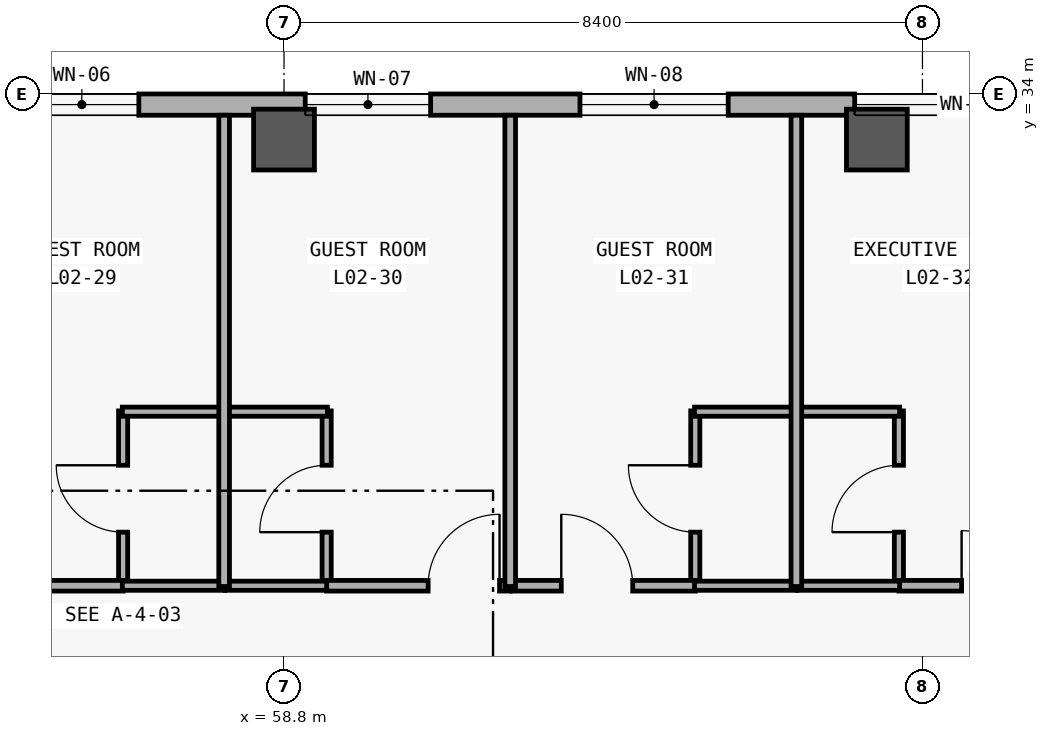
"""IFC4 building model, lengths in metres.
Left out: names, types, materials, properties, quantities, classifications, styles, units other than length and angle.
Written with IfcOpenShell. Run it as: python <this file> out.ifc"""

import sys

from ifc_helpers import new_model, si_unit, direction, frame, frame_2d, origin, origin_2d, place, context, subcontext, project, spatial, rectangle, extrude, element, fill, save


model = new_model("IFC4")
c1 = context("Model", 3, precision=1e-05, world=origin(), true_north=direction((0.0, 1.0)))
c2 = subcontext(c1, "Body", "Model", "MODEL_VIEW")
j1 = project(units=[si_unit("LENGTHUNIT", "METRE"), si_unit("PLANEANGLEUNIT", "RADIAN")], contexts=[c1])
p1 = place(None, origin())
s1 = spatial("IfcSite", under=j1, at=p1, CompositionType="ELEMENT")
p2 = place(p1, origin())
s2 = spatial("IfcBuilding", under=s1, at=p2, CompositionType="ELEMENT")
p3 = place(p2, frame((0.0, 0.0, 10.8)))
s3 = spatial("IfcBuildingStorey", under=s2, at=p3, CompositionType="ELEMENT", Elevation=10.8)
for number, where, z_axis, x_axis in (
    (1, (58.8, 33.4, 0.0), (0.0, 0.0, 1.0), (1.0, 0.0, 0.0)),
    (2, (66.6, 33.4, 0.0), (0.0, 0.0, 1.0), (1.0, 0.0, 0.0)),
):
    element("IfcColumn", number, at=place(p3, frame(where, z_axis=z_axis, x_axis=x_axis)), inside=s3, PredefinedType="COLUMN", context=c2, shape_type="SweptSolid", body=[
        extrude(rectangle(XDim=0.8, YDim=0.8, at=origin_2d()), origin(), (0.0, 0.0, 1.0), 4.2),
    ])
p4 = place(p3, frame((8.68, 33.86, 0.0), z_axis=(0.0, 0.0, 1.0), x_axis=(1.0, 0.0, 0.0)))
e3 = element("IfcWall", 3, at=p4, inside=s3, PredefinedType="SOLIDWALL", context=c2, shape_type="SweptSolid", body=[
    extrude(rectangle(XDim=83.44, YDim=0.28, at=frame_2d((41.72, 0.0))), origin(), (0.0, 0.0, 1.0), 3.92),
])
p5 = place(p4, frame((5.07, 0.0, 0.85)))
e4 = element("IfcOpeningElement", 4, at=p5, cuts=e3, PredefinedType="OPENING", context=c2, shape_type="SweptSolid", body=[
    extrude(rectangle(XDim=1.7, YDim=2.0, at=frame_2d((0.85, 1.0))), frame((0.0, 0.15, 0.0), z_axis=(0.0, -1.0, 0.0), x_axis=(1.0, 0.0, 0.0)), (0.0, 0.0, 1.0), 0.3),
])
p6 = place(p4, frame((12.557, 0.0, 0.85)))
e5 = element("IfcOpeningElement", 5, at=p6, cuts=e3, PredefinedType="OPENING", context=c2, shape_type="SweptSolid", body=[
    extrude(rectangle(XDim=2.05, YDim=1.95, at=frame_2d((1.025, 0.975))), frame((0.0, 0.15, 0.0), z_axis=(0.0, -1.0, 0.0), x_axis=(1.0, 0.0, 0.0)), (0.0, 0.0, 1.0), 0.3),
])
p7 = place(p4, frame((16.256, 0.0, 0.85)))
e6 = element("IfcOpeningElement", 6, at=p7, cuts=e3, PredefinedType="OPENING", context=c2, shape_type="SweptSolid", body=[
    extrude(rectangle(XDim=2.18, YDim=1.95, at=frame_2d((1.09, 0.975))), frame((0.0, 0.15, 0.0), z_axis=(0.0, -1.0, 0.0), x_axis=(1.0, 0.0, 0.0)), (0.0, 0.0, 1.0), 0.3),
])
p8 = place(p4, frame((19.921, 0.0, 0.85)))
e7 = element("IfcOpeningElement", 7, at=p8, cuts=e3, PredefinedType="OPENING", context=c2, shape_type="SweptSolid", body=[
    extrude(rectangle(XDim=2.38, YDim=1.95, at=frame_2d((1.19, 0.975))), frame((0.0, 0.15, 0.0), z_axis=(0.0, -1.0, 0.0), x_axis=(1.0, 0.0, 0.0)), (0.0, 0.0, 1.0), 0.3),
])
p9 = place(p4, frame((23.635, 0.0, 0.85)))
e8 = element("IfcOpeningElement", 8, at=p9, cuts=e3, PredefinedType="OPENING", context=c2, shape_type="SweptSolid", body=[
    extrude(rectangle(XDim=2.48, YDim=2.0, at=frame_2d((1.24, 1.0))), frame((0.0, 0.15, 0.0), z_axis=(0.0, -1.0, 0.0), x_axis=(1.0, 0.0, 0.0)), (0.0, 0.0, 1.0), 0.3),
])
p10 = place(p4, frame((27.314, 0.0, 0.85)))
e9 = element("IfcOpeningElement", 9, at=p10, cuts=e3, PredefinedType="OPENING", context=c2, shape_type="SweptSolid", body=[
    extrude(rectangle(XDim=2.65, YDim=2.0, at=frame_2d((1.325, 1.0))), frame((0.0, 0.15, 0.0), z_axis=(0.0, -1.0, 0.0), x_axis=(1.0, 0.0, 0.0)), (0.0, 0.0, 1.0), 0.3),
])
p11 = place(p4, frame((31.503, 0.0, 0.85)))
e10 = element("IfcOpeningElement", 10, at=p11, cuts=e3, PredefinedType="OPENING", context=c2, shape_type="SweptSolid", body=[
    extrude(rectangle(XDim=1.8, YDim=1.8, at=frame_2d((0.9, 0.9))), frame((0.0, 0.15, 0.0), z_axis=(0.0, -1.0, 0.0), x_axis=(1.0, 0.0, 0.0)), (0.0, 0.0, 1.0), 0.3),
])
p12 = place(p4, frame((35.117, 0.0, 0.85)))
e11 = element("IfcOpeningElement", 11, at=p12, cuts=e3, PredefinedType="OPENING", context=c2, shape_type="SweptSolid", body=[
    extrude(rectangle(XDim=2.1, YDim=1.8, at=frame_2d((1.05, 0.9))), frame((0.0, 0.15, 0.0), z_axis=(0.0, -1.0, 0.0), x_axis=(1.0, 0.0, 0.0)), (0.0, 0.0, 1.0), 0.3),
])
p13 = place(p4, frame((38.731, 0.0, 0.85)))
e12 = element("IfcOpeningElement", 12, at=p13, cuts=e3, PredefinedType="OPENING", context=c2, shape_type="SweptSolid", body=[
    extrude(rectangle(XDim=2.4, YDim=1.8, at=frame_2d((1.2, 0.9))), frame((0.0, 0.15, 0.0), z_axis=(0.0, -1.0, 0.0), x_axis=(1.0, 0.0, 0.0)), (0.0, 0.0, 1.0), 0.3),
])
p14 = place(p4, frame((42.346, 0.0, 0.85)))
e13 = element("IfcOpeningElement", 13, at=p14, cuts=e3, PredefinedType="OPENING", context=c2, shape_type="SweptSolid", body=[
    extrude(rectangle(XDim=2.7, YDim=1.85, at=frame_2d((1.35, 0.925))), frame((0.0, 0.15, 0.0), z_axis=(0.0, -1.0, 0.0), x_axis=(1.0, 0.0, 0.0)), (0.0, 0.0, 1.0), 0.3),
])
p15 = place(p4, frame((46.71, 0.0, 0.85)))
e14 = element("IfcOpeningElement", 14, at=p15, cuts=e3, PredefinedType="OPENING", context=c2, shape_type="SweptSolid", body=[
    extrude(rectangle(XDim=1.5, YDim=1.75, at=frame_2d((0.75, 0.875))), frame((0.0, 0.15, 0.0), z_axis=(0.0, -1.0, 0.0), x_axis=(1.0, 0.0, 0.0)), (0.0, 0.0, 1.0), 0.3),
])
p16 = place(p4, frame((50.399, 0.0, 0.85)))
e15 = element("IfcOpeningElement", 15, at=p16, cuts=e3, PredefinedType="OPENING", context=c2, shape_type="SweptSolid", body=[
    extrude(rectangle(XDim=1.65, YDim=1.75, at=frame_2d((0.825, 0.875))), frame((0.0, 0.15, 0.0), z_axis=(0.0, -1.0, 0.0), x_axis=(1.0, 0.0, 0.0)), (0.0, 0.0, 1.0), 0.3),
])
p17 = place(p4, frame((54.014, 0.0, 0.85)))
e16 = element("IfcOpeningElement", 16, at=p17, cuts=e3, PredefinedType="OPENING", context=c2, shape_type="SweptSolid", body=[
    extrude(rectangle(XDim=1.95, YDim=1.75, at=frame_2d((0.975, 0.875))), frame((0.0, 0.15, 0.0), z_axis=(0.0, -1.0, 0.0), x_axis=(1.0, 0.0, 0.0)), (0.0, 0.0, 1.0), 0.3),
])
p18 = place(p4, frame((57.628, 0.0, 0.85)))
e17 = element("IfcOpeningElement", 17, at=p18, cuts=e3, PredefinedType="OPENING", context=c2, shape_type="SweptSolid", body=[
    extrude(rectangle(XDim=2.25, YDim=1.75, at=frame_2d((1.125, 0.875))), frame((0.0, 0.15, 0.0), z_axis=(0.0, -1.0, 0.0), x_axis=(1.0, 0.0, 0.0)), (0.0, 0.0, 1.0), 0.3),
])
p19 = place(p4, frame((61.242, 0.0, 0.85)))
e18 = element("IfcOpeningElement", 18, at=p19, cuts=e3, PredefinedType="OPENING", context=c2, shape_type="SweptSolid", body=[
    extrude(rectangle(XDim=2.55, YDim=1.8, at=frame_2d((1.275, 0.9))), frame((0.0, 0.15, 0.0), z_axis=(0.0, -1.0, 0.0), x_axis=(1.0, 0.0, 0.0)), (0.0, 0.0, 1.0), 0.3),
])
p20 = place(p4, frame((64.856, 0.0, 0.85)))
e19 = element("IfcOpeningElement", 19, at=p20, cuts=e3, PredefinedType="OPENING", context=c2, shape_type="SweptSolid", body=[
    extrude(rectangle(XDim=2.85, YDim=1.85, at=frame_2d((1.425, 0.925))), frame((0.0, 0.15, 0.0), z_axis=(0.0, -1.0, 0.0), x_axis=(1.0, 0.0, 0.0)), (0.0, 0.0, 1.0), 0.3),
])
p21 = place(p4, frame((69.345, 0.0, 0.85)))
e20 = element("IfcOpeningElement", 20, at=p21, cuts=e3, PredefinedType="OPENING", context=c2, shape_type="SweptSolid", body=[
    extrude(rectangle(XDim=1.4, YDim=1.6, at=frame_2d((0.7, 0.8))), frame((0.0, 0.15, 0.0), z_axis=(0.0, -1.0, 0.0), x_axis=(1.0, 0.0, 0.0)), (0.0, 0.0, 1.0), 0.3),
])
p22 = place(p4, frame((73.009, 0.0, 0.85)))
e21 = element("IfcOpeningElement", 21, at=p22, cuts=e3, PredefinedType="OPENING", context=c2, shape_type="SweptSolid", body=[
    extrude(rectangle(XDim=1.6, YDim=1.6, at=frame_2d((0.8, 0.8))), frame((0.0, 0.15, 0.0), z_axis=(0.0, -1.0, 0.0), x_axis=(1.0, 0.0, 0.0)), (0.0, 0.0, 1.0), 0.3),
])
p23 = place(p4, frame((76.674, 0.0, 0.85)))
e22 = element("IfcOpeningElement", 22, at=p23, cuts=e3, PredefinedType="OPENING", context=c2, shape_type="SweptSolid", body=[
    extrude(rectangle(XDim=1.8, YDim=1.6, at=frame_2d((0.9, 0.8))), frame((0.0, 0.15, 0.0), z_axis=(0.0, -1.0, 0.0), x_axis=(1.0, 0.0, 0.0)), (0.0, 0.0, 1.0), 0.3),
])
p24 = place(p4, frame((80.338, 0.0, 0.85)))
e23 = element("IfcOpeningElement", 23, at=p24, cuts=e3, PredefinedType="OPENING", context=c2, shape_type="SweptSolid", body=[
    extrude(rectangle(XDim=2.0, YDim=1.65, at=frame_2d((1.0, 0.825))), frame((0.0, 0.15, 0.0), z_axis=(0.0, -1.0, 0.0), x_axis=(1.0, 0.0, 0.0)), (0.0, 0.0, 1.0), 0.3),
])
p25 = place(p3, frame((56.683, 27.52, 0.0), z_axis=(0.0, 0.0, 1.0), x_axis=(0.0, 1.0, 0.0)))
e24 = element("IfcWall", 24, at=p25, inside=s3, PredefinedType="PARTITIONING", context=c2, shape_type="SweptSolid", body=[
    extrude(rectangle(XDim=2.31, YDim=0.12, at=frame_2d((1.155, 0.0))), origin(), (0.0, 0.0, 1.0), 3.02),
])
p26 = place(p25, frame((0.715, 0.0, 0.0)))
e25 = element("IfcOpeningElement", 25, at=p26, cuts=e24, PredefinedType="OPENING", context=c2, shape_type="SweptSolid", body=[
    extrude(rectangle(XDim=0.88, YDim=2.15, at=frame_2d((0.44, 1.075))), frame((0.0, 0.07, 0.0), z_axis=(0.0, -1.0, 0.0), x_axis=(1.0, 0.0, 0.0)), (0.0, 0.0, 1.0), 0.14),
])
p27 = place(p3, frame((59.361, 27.52, 0.0), z_axis=(0.0, 0.0, 1.0), x_axis=(0.0, 1.0, 0.0)))
e26 = element("IfcWall", 26, at=p27, inside=s3, PredefinedType="PARTITIONING", context=c2, shape_type="SweptSolid", body=[
    extrude(rectangle(XDim=2.31, YDim=0.12, at=frame_2d((1.155, 0.0))), origin(), (0.0, 0.0, 1.0), 3.02),
])
p28 = place(p27, frame((0.715, 0.0, 0.0)))
e27 = element("IfcOpeningElement", 27, at=p28, cuts=e26, PredefinedType="OPENING", context=c2, shape_type="SweptSolid", body=[
    extrude(rectangle(XDim=0.88, YDim=2.15, at=frame_2d((0.44, 1.075))), frame((0.0, 0.07, 0.0), z_axis=(0.0, -1.0, 0.0), x_axis=(1.0, 0.0, 0.0)), (0.0, 0.0, 1.0), 0.14),
])
p29 = place(p3, frame((64.211, 27.52, 0.0), z_axis=(0.0, 0.0, 1.0), x_axis=(0.0, 1.0, 0.0)))
e28 = element("IfcWall", 28, at=p29, inside=s3, PredefinedType="PARTITIONING", context=c2, shape_type="SweptSolid", body=[
    extrude(rectangle(XDim=2.31, YDim=0.12, at=frame_2d((1.155, 0.0))), origin(), (0.0, 0.0, 1.0), 3.02),
])
p30 = place(p29, frame((0.715, 0.0, 0.0)))
e29 = element("IfcOpeningElement", 29, at=p30, cuts=e28, PredefinedType="OPENING", context=c2, shape_type="SweptSolid", body=[
    extrude(rectangle(XDim=0.88, YDim=2.15, at=frame_2d((0.44, 1.075))), frame((0.0, 0.07, 0.0), z_axis=(0.0, -1.0, 0.0), x_axis=(1.0, 0.0, 0.0)), (0.0, 0.0, 1.0), 0.14),
])
p31 = place(p3, frame((66.89, 27.52, 0.0), z_axis=(0.0, 0.0, 1.0), x_axis=(0.0, 1.0, 0.0)))
e30 = element("IfcWall", 30, at=p31, inside=s3, PredefinedType="PARTITIONING", context=c2, shape_type="SweptSolid", body=[
    extrude(rectangle(XDim=2.31, YDim=0.12, at=frame_2d((1.155, 0.0))), origin(), (0.0, 0.0, 1.0), 3.02),
])
p32 = place(p31, frame((0.715, 0.0, 0.0)))
e31 = element("IfcOpeningElement", 31, at=p32, cuts=e30, PredefinedType="OPENING", context=c2, shape_type="SweptSolid", body=[
    extrude(rectangle(XDim=0.88, YDim=2.15, at=frame_2d((0.44, 1.075))), frame((0.0, 0.07, 0.0), z_axis=(0.0, -1.0, 0.0), x_axis=(1.0, 0.0, 0.0)), (0.0, 0.0, 1.0), 0.14),
])
p33 = place(p3, frame((54.268, 27.53, 0.0), z_axis=(0.0, 0.0, 1.0), x_axis=(1.0, 0.0, 0.0)))
e32 = element("IfcWall", 32, at=p33, inside=s3, PredefinedType="PARTITIONING", context=c2, shape_type="SweptSolid", body=[
    extrude(rectangle(XDim=2.415, YDim=0.14, at=frame_2d((1.208, 0.0))), origin(), (0.0, 0.0, 1.0), 3.02),
])
p34 = place(p33, frame((0.481, 0.0, 0.0)))
e33 = element("IfcOpeningElement", 33, at=p34, cuts=e32, PredefinedType="OPENING", context=c2, shape_type="SweptSolid", body=[
    extrude(rectangle(XDim=0.94, YDim=2.2, at=frame_2d((0.47, 1.1))), frame((0.0, 0.08, 0.0), z_axis=(0.0, -1.0, 0.0), x_axis=(1.0, 0.0, 0.0)), (0.0, 0.0, 1.0), 0.16),
])
p35 = place(p3, frame((59.361, 27.53, 0.0), z_axis=(0.0, 0.0, 1.0), x_axis=(1.0, 0.0, 0.0)))
e34 = element("IfcWall", 34, at=p35, inside=s3, PredefinedType="PARTITIONING", context=c2, shape_type="SweptSolid", body=[
    extrude(rectangle(XDim=2.415, YDim=0.14, at=frame_2d((1.208, 0.0))), origin(), (0.0, 0.0, 1.0), 3.02),
])
p36 = place(p35, frame((1.335, 0.0, 0.0)))
e35 = element("IfcOpeningElement", 35, at=p36, cuts=e34, PredefinedType="OPENING", context=c2, shape_type="SweptSolid", body=[
    extrude(rectangle(XDim=0.94, YDim=2.2, at=frame_2d((0.47, 1.1))), frame((0.0, 0.08, 0.0), z_axis=(0.0, -1.0, 0.0), x_axis=(1.0, 0.0, 0.0)), (0.0, 0.0, 1.0), 0.16),
])
p37 = place(p3, frame((61.796, 27.53, 0.0), z_axis=(0.0, 0.0, 1.0), x_axis=(1.0, 0.0, 0.0)))
e36 = element("IfcWall", 36, at=p37, inside=s3, PredefinedType="PARTITIONING", context=c2, shape_type="SweptSolid", body=[
    extrude(rectangle(XDim=2.415, YDim=0.14, at=frame_2d((1.208, 0.0))), origin(), (0.0, 0.0, 1.0), 3.02),
])
p38 = place(p37, frame((0.652, 0.0, 0.0)))
e37 = element("IfcOpeningElement", 37, at=p38, cuts=e36, PredefinedType="OPENING", context=c2, shape_type="SweptSolid", body=[
    extrude(rectangle(XDim=0.94, YDim=2.2, at=frame_2d((0.47, 1.1))), frame((0.0, 0.08, 0.0), z_axis=(0.0, -1.0, 0.0), x_axis=(1.0, 0.0, 0.0)), (0.0, 0.0, 1.0), 0.16),
])
p39 = place(p3, frame((66.89, 27.53, 0.0), z_axis=(0.0, 0.0, 1.0), x_axis=(1.0, 0.0, 0.0)))
e38 = element("IfcWall", 38, at=p39, inside=s3, PredefinedType="PARTITIONING", context=c2, shape_type="SweptSolid", body=[
    extrude(rectangle(XDim=2.415, YDim=0.14, at=frame_2d((1.208, 0.0))), origin(), (0.0, 0.0, 1.0), 3.02),
])
p40 = place(p39, frame((0.825, 0.0, 0.0)))
e39 = element("IfcOpeningElement", 39, at=p40, cuts=e38, PredefinedType="OPENING", context=c2, shape_type="SweptSolid", body=[
    extrude(rectangle(XDim=1.45, YDim=2.3, at=frame_2d((0.725, 1.15))), frame((0.0, 0.08, 0.0), z_axis=(0.0, -1.0, 0.0), x_axis=(1.0, 0.0, 0.0)), (0.0, 0.0, 1.0), 0.16),
])
for number, where, z_axis, x_axis in (
    (40, (56.673, 27.53, 0.0), (0.0, 0.0, 1.0), (1.0, 0.0, 0.0)),
    (41, (56.673, 29.82, 0.0), (0.0, 0.0, 1.0), (1.0, 0.0, 0.0)),
):
    element("IfcWall", number, at=place(p3, frame(where, z_axis=z_axis, x_axis=x_axis)), inside=s3, PredefinedType="PARTITIONING", context=c2, shape_type="SweptSolid", body=[
        extrude(rectangle(XDim=1.349, YDim=0.12, at=frame_2d((0.674, 0.0))), origin(), (0.0, 0.0, 1.0), 3.02),
    ])
p41 = place(p3, frame((58.022, 27.53, 0.0), z_axis=(0.0, 0.0, 1.0), x_axis=(1.0, 0.0, 0.0)))
e42 = element("IfcWall", 42, at=p41, inside=s3, PredefinedType="PARTITIONING", context=c2, shape_type="SweptSolid", body=[
    extrude(rectangle(XDim=1.339, YDim=0.12, at=frame_2d((0.669, 0.0))), origin(), (0.0, 0.0, 1.0), 3.02),
])
p42 = place(p3, frame((58.022, 29.82, 0.0), z_axis=(0.0, 0.0, 1.0), x_axis=(1.0, 0.0, 0.0)))
e43 = element("IfcWall", 43, at=p42, inside=s3, PredefinedType="PARTITIONING", context=c2, shape_type="SweptSolid", body=[
    extrude(rectangle(XDim=1.349, YDim=0.12, at=frame_2d((0.675, 0.0))), origin(), (0.0, 0.0, 1.0), 3.02),
])
for number, where, z_axis, x_axis in (
    (44, (64.201, 27.53, 0.0), (0.0, 0.0, 1.0), (1.0, 0.0, 0.0)),
    (45, (64.201, 29.82, 0.0), (0.0, 0.0, 1.0), (1.0, 0.0, 0.0)),
):
    element("IfcWall", number, at=place(p3, frame(where, z_axis=z_axis, x_axis=x_axis)), inside=s3, PredefinedType="PARTITIONING", context=c2, shape_type="SweptSolid", body=[
        extrude(rectangle(XDim=1.35, YDim=0.12, at=frame_2d((0.675, 0.0))), origin(), (0.0, 0.0, 1.0), 3.02),
    ])
for number, where, z_axis, x_axis in (
    (46, (65.551, 27.53, 0.0), (0.0, 0.0, 1.0), (1.0, 0.0, 0.0)),
    (47, (65.551, 29.82, 0.0), (0.0, 0.0, 1.0), (1.0, 0.0, 0.0)),
):
    element("IfcWall", number, at=place(p3, frame(where, z_axis=z_axis, x_axis=x_axis)), inside=s3, PredefinedType="PARTITIONING", context=c2, shape_type="SweptSolid", body=[
        extrude(rectangle(XDim=1.349, YDim=0.12, at=frame_2d((0.674, 0.0))), origin(), (0.0, 0.0, 1.0), 3.02),
    ])
for number, where, z_axis, x_axis in (
    (48, (58.012, 27.52, 0.0), (0.0, 0.0, 1.0), (0.0, 1.0, 0.0)),
    (49, (61.776, 27.52, 0.0), (0.0, 0.0, 1.0), (0.0, 1.0, 0.0)),
    (50, (65.541, 27.52, 0.0), (0.0, 0.0, 1.0), (0.0, 1.0, 0.0)),
):
    element("IfcWall", number, at=place(p3, frame(where, z_axis=z_axis, x_axis=x_axis)), inside=s3, PredefinedType="PARTITIONING", context=c2, shape_type="SweptSolid", body=[
        extrude(rectangle(XDim=6.2, YDim=0.14, at=frame_2d((3.1, 0.0))), origin(), (0.0, 0.0, 1.0), 3.02),
    ])
p43 = place(p15, origin())
e51 = element("IfcWindow", 51, at=p43, inside=s3, PartitioningType="SINGLE_PANEL", PredefinedType="WINDOW", context=c2, shape_type="SweptSolid", body=[
    extrude(rectangle(XDim=1.5, YDim=1.75, at=frame_2d((0.75, 0.875))), frame((0.0, 0.03, 0.0), z_axis=(0.0, -1.0, 0.0), x_axis=(1.0, 0.0, 0.0)), (0.0, 0.0, 1.0), 0.06),
])
fill(e14, e51)
p44 = place(p16, origin())
e52 = element("IfcWindow", 52, at=p44, inside=s3, PartitioningType="SINGLE_PANEL", PredefinedType="WINDOW", context=c2, shape_type="SweptSolid", body=[
    extrude(rectangle(XDim=1.65, YDim=1.75, at=frame_2d((0.825, 0.875))), frame((0.0, 0.03, 0.0), z_axis=(0.0, -1.0, 0.0), x_axis=(1.0, 0.0, 0.0)), (0.0, 0.0, 1.0), 0.06),
])
fill(e15, e52)
p45 = place(p17, origin())
e53 = element("IfcWindow", 53, at=p45, inside=s3, PartitioningType="SINGLE_PANEL", PredefinedType="WINDOW", context=c2, shape_type="SweptSolid", body=[
    extrude(rectangle(XDim=1.95, YDim=1.75, at=frame_2d((0.975, 0.875))), frame((0.0, 0.03, 0.0), z_axis=(0.0, -1.0, 0.0), x_axis=(1.0, 0.0, 0.0)), (0.0, 0.0, 1.0), 0.06),
])
fill(e16, e53)
p46 = place(p18, origin())
e54 = element("IfcWindow", 54, at=p46, inside=s3, PartitioningType="SINGLE_PANEL", PredefinedType="WINDOW", context=c2, shape_type="SweptSolid", body=[
    extrude(rectangle(XDim=2.25, YDim=1.75, at=frame_2d((1.125, 0.875))), frame((0.0, 0.03, 0.0), z_axis=(0.0, -1.0, 0.0), x_axis=(1.0, 0.0, 0.0)), (0.0, 0.0, 1.0), 0.06),
])
fill(e17, e54)
p47 = place(p26, origin())
e55 = element("IfcDoor", 55, at=p47, inside=s3, OperationType="SINGLE_SWING_RIGHT", PredefinedType="DOOR", context=c2, shape_type="SweptSolid", body=[
    extrude(rectangle(XDim=0.88, YDim=2.15, at=frame_2d((0.44, 1.075))), frame((0.0, 0.025, 0.0), z_axis=(0.0, -1.0, 0.0), x_axis=(1.0, 0.0, 0.0)), (0.0, 0.0, 1.0), 0.05),
])
fill(e25, e55)
p48 = place(p28, origin())
e56 = element("IfcDoor", 56, at=p48, inside=s3, OperationType="SINGLE_SWING_LEFT", PredefinedType="DOOR", context=c2, shape_type="SweptSolid", body=[
    extrude(rectangle(XDim=0.88, YDim=2.15, at=frame_2d((0.44, 1.075))), frame((0.0, 0.025, 0.0), z_axis=(0.0, -1.0, 0.0), x_axis=(1.0, 0.0, 0.0)), (0.0, 0.0, 1.0), 0.05),
])
fill(e27, e56)
p49 = place(p30, origin())
e57 = element("IfcDoor", 57, at=p49, inside=s3, OperationType="SINGLE_SWING_RIGHT", PredefinedType="DOOR", context=c2, shape_type="SweptSolid", body=[
    extrude(rectangle(XDim=0.88, YDim=2.15, at=frame_2d((0.44, 1.075))), frame((0.0, 0.025, 0.0), z_axis=(0.0, -1.0, 0.0), x_axis=(1.0, 0.0, 0.0)), (0.0, 0.0, 1.0), 0.05),
])
fill(e29, e57)
p50 = place(p32, origin())
e58 = element("IfcDoor", 58, at=p50, inside=s3, OperationType="SINGLE_SWING_LEFT", PredefinedType="DOOR", context=c2, shape_type="SweptSolid", body=[
    extrude(rectangle(XDim=0.88, YDim=2.15, at=frame_2d((0.44, 1.075))), frame((0.0, 0.025, 0.0), z_axis=(0.0, -1.0, 0.0), x_axis=(1.0, 0.0, 0.0)), (0.0, 0.0, 1.0), 0.05),
])
fill(e31, e58)
p51 = place(p36, origin())
e59 = element("IfcDoor", 59, at=p51, inside=s3, OperationType="SINGLE_SWING_RIGHT", PredefinedType="DOOR", context=c2, shape_type="SweptSolid", body=[
    extrude(rectangle(XDim=0.94, YDim=2.2, at=frame_2d((0.47, 1.1))), frame((0.0, 0.025, 0.0), z_axis=(0.0, -1.0, 0.0), x_axis=(1.0, 0.0, 0.0)), (0.0, 0.0, 1.0), 0.05),
])
fill(e35, e59)
p52 = place(p38, origin())
e60 = element("IfcDoor", 60, at=p52, inside=s3, OperationType="SINGLE_SWING_LEFT", PredefinedType="DOOR", context=c2, shape_type="SweptSolid", body=[
    extrude(rectangle(XDim=0.94, YDim=2.2, at=frame_2d((0.47, 1.1))), frame((0.0, 0.025, 0.0), z_axis=(0.0, -1.0, 0.0), x_axis=(1.0, 0.0, 0.0)), (0.0, 0.0, 1.0), 0.05),
])
fill(e37, e60)
p53 = place(p40, origin())
e61 = element("IfcDoor", 61, at=p53, inside=s3, OperationType="DOUBLE_DOOR_SINGLE_SWING", PredefinedType="DOOR", context=c2, shape_type="SweptSolid", body=[
    extrude(rectangle(XDim=1.45, YDim=2.3, at=frame_2d((0.725, 1.15))), frame((0.0, 0.025, 0.0), z_axis=(0.0, -1.0, 0.0), x_axis=(1.0, 0.0, 0.0)), (0.0, 0.0, 1.0), 0.05),
])
fill(e39, e61)
save(model, sys.argv[1])
